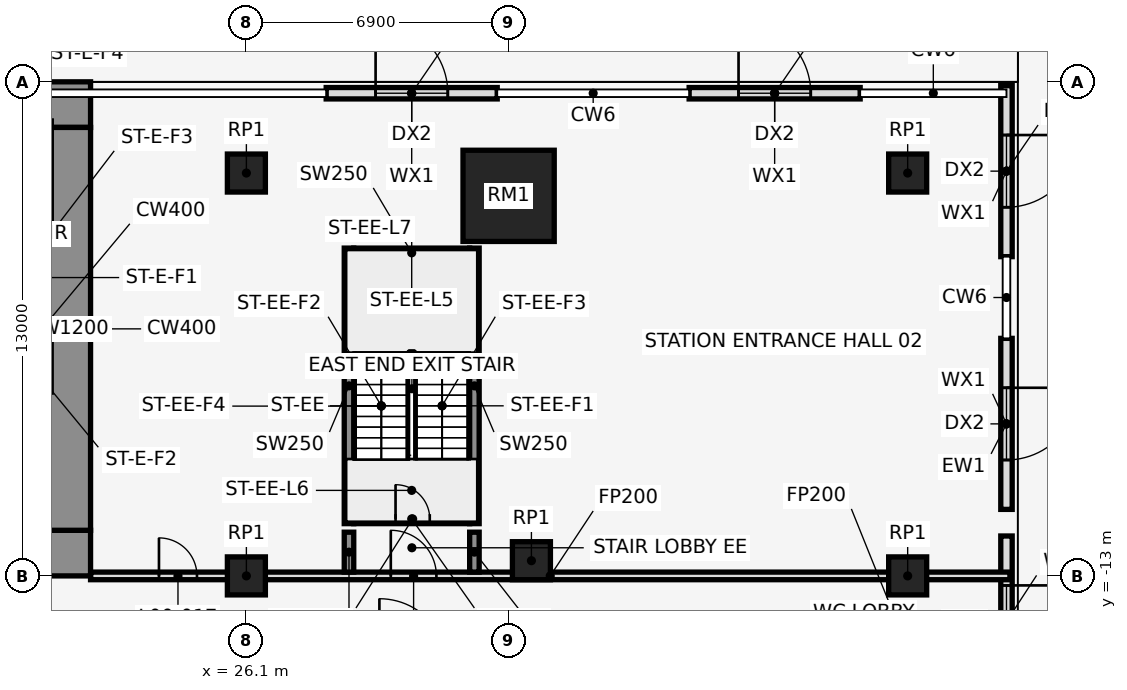
"""IFC4 building model, lengths in metres.
Left out: names, types, materials, properties, quantities, classifications, styles, units other than length and angle.
Written with IfcOpenShell. Run it as: python <this file> out.ifc"""

import sys

from ifc_helpers import new_model, si_unit, direction, frame, frame_2d, origin, origin_2d, place, context, subcontext, project, spatial, rectangle, extrude, element, fill, save


model = new_model("IFC4")
c1 = context("Model", 3, precision=1e-05, world=origin(), true_north=direction((0.0, 1.0)))
c2 = subcontext(c1, "Body", "Model", "MODEL_VIEW")
j1 = project(units=[si_unit("LENGTHUNIT", "METRE"), si_unit("PLANEANGLEUNIT", "RADIAN")], contexts=[c1])
p1 = place(None, origin())
s1 = spatial("IfcSite", under=j1, at=p1, CompositionType="ELEMENT")
p2 = place(p1, origin())
s2 = spatial("IfcBuilding", under=s1, at=p2, CompositionType="ELEMENT")
p3 = place(p2, origin())
s3 = spatial("IfcBuildingStorey", under=s2, at=p3, CompositionType="ELEMENT", Elevation=0.0)
p4 = place(p3, frame((26.1, -2.4, 0.0), z_axis=(0.0, 0.0, 1.0), x_axis=(1.0, 0.0, 0.0)))
e1 = element("IfcColumn", 1, at=p4, inside=s3, PredefinedType="COLUMN", context=c2, shape_type="SweptSolid", body=[
    extrude(rectangle(XDim=1.0, YDim=1.0, at=origin_2d()), origin(), (0.0, 0.0, 1.0), 8.0),
])
p5 = place(p3, frame((33.0, -3.0, 0.0), z_axis=(0.0, 0.0, 1.0), x_axis=(1.0, 0.0, 0.0)))
e2 = element("IfcColumn", 2, at=p5, inside=s3, PredefinedType="COLUMN", context=c2, shape_type="SweptSolid", body=[
    extrude(rectangle(XDim=2.4, YDim=2.4, at=origin_2d()), origin(), (0.0, 0.0, 1.0), 8.0),
])
for number, where, z_axis, x_axis in (
    (3, (33.6, -12.6, 0.0), (0.0, 0.0, 1.0), (1.0, 0.0, 0.0)),
    (4, (26.1, -13.0, 0.0), (0.0, 0.0, 1.0), (1.0, 0.0, 0.0)),
    (5, (43.5, -2.4, 0.0), (0.0, 0.0, 1.0), (1.0, 0.0, 0.0)),
    (6, (43.5, -13.0, 0.0), (0.0, 0.0, 1.0), (1.0, 0.0, 0.0)),
):
    element("IfcColumn", number, at=place(p3, frame(where, z_axis=z_axis, x_axis=x_axis)), inside=s3, PredefinedType="COLUMN", context=c2, shape_type="SweptSolid", body=[
        extrude(rectangle(XDim=1.0, YDim=1.0, at=origin_2d()), origin(), (0.0, 0.0, 1.0), 8.0),
    ])
p6 = place(p3, frame((46.1, -11.95, 0.0), z_axis=(0.0, 0.0, 1.0), x_axis=(0.0, -1.0, 0.0)))
e7 = element("IfcWall", 7, at=p6, inside=s3, PredefinedType="STANDARD", context=c2, shape_type="SweptSolid", body=[
    extrude(rectangle(XDim=4.5, YDim=0.3, at=frame_2d((2.25, 0.0))), origin(), (0.0, 0.0, 1.0), 7.7),
])
p7 = place(p6, frame((1.3, 0.0, 0.0)))
e8 = element("IfcOpeningElement", 8, at=p7, cuts=e7, PredefinedType="OPENING", context=c2, shape_type="SweptSolid", body=[
    extrude(rectangle(XDim=1.9, YDim=2.6, at=frame_2d((0.95, 1.3))), frame((0.0, 0.162, 0.0), z_axis=(0.0, -1.0, 0.0), x_axis=(1.0, 0.0, 0.0)), (0.0, 0.0, 1.0), 0.324),
])
p8 = place(p6, frame((1.3, 0.0, 3.3)))
e9 = element("IfcOpeningElement", 9, at=p8, cuts=e7, PredefinedType="OPENING", context=c2, shape_type="SweptSolid", body=[
    extrude(rectangle(XDim=1.9, YDim=3.0, at=frame_2d((0.95, 1.5))), frame((0.0, 0.162, 0.0), z_axis=(0.0, -1.0, 0.0), x_axis=(1.0, 0.0, 0.0)), (0.0, 0.0, 1.0), 0.324),
])
p9 = place(p3, frame((46.1, -6.75, 0.0), z_axis=(0.0, 0.0, 1.0), x_axis=(0.0, -1.0, 0.0)))
e10 = element("IfcWall", 10, at=p9, inside=s3, PredefinedType="STANDARD", context=c2, shape_type="SweptSolid", body=[
    extrude(rectangle(XDim=4.5, YDim=0.3, at=frame_2d((2.25, 0.0))), origin(), (0.0, 0.0, 1.0), 7.7),
])
p10 = place(p9, frame((1.3, 0.0, 0.0)))
e11 = element("IfcOpeningElement", 11, at=p10, cuts=e10, PredefinedType="OPENING", context=c2, shape_type="SweptSolid", body=[
    extrude(rectangle(XDim=1.9, YDim=2.6, at=frame_2d((0.95, 1.3))), frame((0.0, 0.162, 0.0), z_axis=(0.0, -1.0, 0.0), x_axis=(1.0, 0.0, 0.0)), (0.0, 0.0, 1.0), 0.324),
])
p11 = place(p9, frame((1.3, 0.0, 3.3)))
e12 = element("IfcOpeningElement", 12, at=p11, cuts=e10, PredefinedType="OPENING", context=c2, shape_type="SweptSolid", body=[
    extrude(rectangle(XDim=1.9, YDim=3.0, at=frame_2d((0.95, 1.5))), frame((0.0, 0.162, 0.0), z_axis=(0.0, -1.0, 0.0), x_axis=(1.0, 0.0, 0.0)), (0.0, 0.0, 1.0), 0.324),
])
p12 = place(p3, frame((46.1, -0.1, 0.0), z_axis=(0.0, 0.0, 1.0), x_axis=(0.0, -1.0, 0.0)))
e13 = element("IfcWall", 13, at=p12, inside=s3, PredefinedType="STANDARD", context=c2, shape_type="SweptSolid", body=[
    extrude(rectangle(XDim=4.5, YDim=0.3, at=frame_2d((2.25, 0.0))), origin(), (0.0, 0.0, 1.0), 7.7),
])
p13 = place(p12, frame((1.3, 0.0, 0.0)))
e14 = element("IfcOpeningElement", 14, at=p13, cuts=e13, PredefinedType="OPENING", context=c2, shape_type="SweptSolid", body=[
    extrude(rectangle(XDim=1.9, YDim=2.6, at=frame_2d((0.95, 1.3))), frame((0.0, 0.162, 0.0), z_axis=(0.0, -1.0, 0.0), x_axis=(1.0, 0.0, 0.0)), (0.0, 0.0, 1.0), 0.324),
])
p14 = place(p12, frame((1.3, 0.0, 3.3)))
e15 = element("IfcOpeningElement", 15, at=p14, cuts=e13, PredefinedType="OPENING", context=c2, shape_type="SweptSolid", body=[
    extrude(rectangle(XDim=1.9, YDim=3.0, at=frame_2d((0.95, 1.5))), frame((0.0, 0.162, 0.0), z_axis=(0.0, -1.0, 0.0), x_axis=(1.0, 0.0, 0.0)), (0.0, 0.0, 1.0), 0.324),
])
p15 = place(p3, frame((37.75, -0.3, 0.0), z_axis=(0.0, 0.0, 1.0), x_axis=(1.0, 0.0, 0.0)))
e16 = element("IfcWall", 16, at=p15, inside=s3, PredefinedType="STANDARD", context=c2, shape_type="SweptSolid", body=[
    extrude(rectangle(XDim=4.5, YDim=0.3, at=frame_2d((2.25, 0.0))), origin(), (0.0, 0.0, 1.0), 7.7),
])
p16 = place(p15, frame((1.3, 0.0, 0.0)))
e17 = element("IfcOpeningElement", 17, at=p16, cuts=e16, PredefinedType="OPENING", context=c2, shape_type="SweptSolid", body=[
    extrude(rectangle(XDim=1.9, YDim=2.6, at=frame_2d((0.95, 1.3))), frame((0.0, 0.162, 0.0), z_axis=(0.0, -1.0, 0.0), x_axis=(1.0, 0.0, 0.0)), (0.0, 0.0, 1.0), 0.324),
])
p17 = place(p15, frame((1.3, 0.0, 3.3)))
e18 = element("IfcOpeningElement", 18, at=p17, cuts=e16, PredefinedType="OPENING", context=c2, shape_type="SweptSolid", body=[
    extrude(rectangle(XDim=1.9, YDim=3.0, at=frame_2d((0.95, 1.5))), frame((0.0, 0.162, 0.0), z_axis=(0.0, -1.0, 0.0), x_axis=(1.0, 0.0, 0.0)), (0.0, 0.0, 1.0), 0.324),
])
p18 = place(p3, frame((28.2, -0.3, 0.0), z_axis=(0.0, 0.0, 1.0), x_axis=(1.0, 0.0, 0.0)))
e19 = element("IfcWall", 19, at=p18, inside=s3, PredefinedType="STANDARD", context=c2, shape_type="SweptSolid", body=[
    extrude(rectangle(XDim=4.5, YDim=0.3, at=frame_2d((2.25, 0.0))), origin(), (0.0, 0.0, 1.0), 7.7),
])
p19 = place(p18, frame((1.3, 0.0, 0.0)))
e20 = element("IfcOpeningElement", 20, at=p19, cuts=e19, PredefinedType="OPENING", context=c2, shape_type="SweptSolid", body=[
    extrude(rectangle(XDim=1.9, YDim=2.6, at=frame_2d((0.95, 1.3))), frame((0.0, 0.162, 0.0), z_axis=(0.0, -1.0, 0.0), x_axis=(1.0, 0.0, 0.0)), (0.0, 0.0, 1.0), 0.324),
])
p20 = place(p18, frame((1.3, 0.0, 3.3)))
e21 = element("IfcOpeningElement", 21, at=p20, cuts=e19, PredefinedType="OPENING", context=c2, shape_type="SweptSolid", body=[
    extrude(rectangle(XDim=1.9, YDim=3.0, at=frame_2d((0.95, 1.5))), frame((0.0, 0.162, 0.0), z_axis=(0.0, -1.0, 0.0), x_axis=(1.0, 0.0, 0.0)), (0.0, 0.0, 1.0), 0.324),
])
for number, where, z_axis, x_axis in (
    (22, (28.8, -11.625, 0.0), (0.0, 0.0, 1.0), (0.0, 1.0, 0.0)),
    (23, (32.1, -11.625, 0.0), (0.0, 0.0, 1.0), (0.0, 1.0, 0.0)),
):
    element("IfcWall", number, at=place(p3, frame(where, z_axis=z_axis, x_axis=x_axis)), inside=s3, PredefinedType="SHEAR", context=c2, shape_type="SweptSolid", body=[
        extrude(rectangle(XDim=7.25, YDim=0.25, at=frame_2d((3.625, 0.0))), origin(), (0.0, 0.0, 1.0), 8.0),
    ])
p21 = place(p3, frame((28.925, -11.5, 0.0), z_axis=(0.0, 0.0, 1.0), x_axis=(1.0, 0.0, 0.0)))
e24 = element("IfcWall", 24, at=p21, inside=s3, PredefinedType="SHEAR", context=c2, shape_type="SweptSolid", body=[
    extrude(rectangle(XDim=3.05, YDim=0.25, at=frame_2d((1.525, 0.0))), origin(), (0.0, 0.0, 1.0), 8.0),
])
p22 = place(p21, frame((1.1, 0.0, 0.0)))
e25 = element("IfcOpeningElement", 25, at=p22, cuts=e24, PredefinedType="OPENING", context=c2, shape_type="SweptSolid", body=[
    extrude(rectangle(XDim=0.9, YDim=2.1, at=frame_2d((0.45, 1.05))), frame((0.0, 0.137, 0.0), z_axis=(0.0, -1.0, 0.0), x_axis=(1.0, 0.0, 0.0)), (0.0, 0.0, 1.0), 0.274),
])
p23 = place(p3, frame((28.925, -4.5, 0.0), z_axis=(0.0, 0.0, 1.0), x_axis=(1.0, 0.0, 0.0)))
e26 = element("IfcWall", 26, at=p23, inside=s3, PredefinedType="SHEAR", context=c2, shape_type="SweptSolid", body=[
    extrude(rectangle(XDim=3.05, YDim=0.25, at=frame_2d((1.525, 0.0))), origin(), (0.0, 0.0, 1.0), 8.0),
])
p24 = place(p3, frame((22.0, -13.0, 0.0), z_axis=(0.0, 0.0, 1.0), x_axis=(1.0, 0.0, 0.0)))
e27 = element("IfcWall", 27, at=p24, inside=s3, PredefinedType="PARTITIONING", context=c2, shape_type="SweptSolid", body=[
    extrude(rectangle(XDim=24.19, YDim=0.2, at=frame_2d((12.095, 0.0))), origin(), (0.0, 0.0, 1.0), 7.7),
])
p25 = place(p24, frame((7.9, 0.0, 0.0)))
e28 = element("IfcOpeningElement", 28, at=p25, cuts=e27, PredefinedType="OPENING", context=c2, shape_type="SweptSolid", body=[
    extrude(rectangle(XDim=1.2, YDim=2.1, at=frame_2d((0.6, 1.05))), frame((0.0, 0.112, 0.0), z_axis=(0.0, -1.0, 0.0), x_axis=(1.0, 0.0, 0.0)), (0.0, 0.0, 1.0), 0.224),
])
p26 = place(p24, frame((1.8, 0.0, 0.0)))
e29 = element("IfcOpeningElement", 29, at=p26, cuts=e27, PredefinedType="OPENING", context=c2, shape_type="SweptSolid", body=[
    extrude(rectangle(XDim=1.0, YDim=2.1, at=frame_2d((0.5, 1.05))), frame((0.0, 0.112, 0.0), z_axis=(0.0, -1.0, 0.0), x_axis=(1.0, 0.0, 0.0)), (0.0, 0.0, 1.0), 0.224),
])
for number, where, z_axis, x_axis in (
    (30, (28.8, -12.9, 0.0), (0.0, 0.0, 1.0), (0.0, 1.0, 0.0)),
    (31, (32.1, -12.9, 0.0), (0.0, 0.0, 1.0), (0.0, 1.0, 0.0)),
):
    element("IfcWall", number, at=place(p3, frame(where, z_axis=z_axis, x_axis=x_axis)), inside=s3, PredefinedType="SHEAR", context=c2, shape_type="SweptSolid", body=[
        extrude(rectangle(XDim=1.05, YDim=0.25, at=frame_2d((0.525, 0.0))), origin(), (0.0, 0.0, 1.0), 8.0),
    ])
p27 = place(p3, frame((-22.0, -0.6, 0.0), z_axis=(0.0, 0.0, 1.0), x_axis=(1.0, 0.0, 0.0)))
e32 = element("IfcWall", 32, at=p27, inside=s3, PredefinedType="SHEAR", context=c2, shape_type="SweptSolid", body=[
    extrude(rectangle(XDim=44.0, YDim=1.2, at=frame_2d((22.0, 0.0))), origin(), (0.0, 0.0, 1.0), 8.0),
])
p28 = place(p3, frame((-22.0, -12.4, 0.0), z_axis=(0.0, 0.0, 1.0), x_axis=(1.0, 0.0, 0.0)))
e33 = element("IfcWall", 33, at=p28, inside=s3, PredefinedType="SHEAR", context=c2, shape_type="SweptSolid", body=[
    extrude(rectangle(XDim=44.0, YDim=1.2, at=frame_2d((22.0, 0.0))), origin(), (0.0, 0.0, 1.0), 8.0),
])
p29 = place(p28, frame((2.2, 0.0, 0.0)))
e34 = element("IfcOpeningElement", 34, at=p29, cuts=e33, PredefinedType="OPENING", context=c2, shape_type="SweptSolid", body=[
    extrude(rectangle(XDim=1.2, YDim=2.1, at=frame_2d((0.6, 1.05))), frame((0.0, 0.612, 0.0), z_axis=(0.0, -1.0, 0.0), x_axis=(1.0, 0.0, 0.0)), (0.0, 0.0, 1.0), 1.224),
])
p30 = place(p28, frame((21.4, 0.0, 0.0)))
e35 = element("IfcOpeningElement", 35, at=p30, cuts=e33, PredefinedType="OPENING", context=c2, shape_type="SweptSolid", body=[
    extrude(rectangle(XDim=1.2, YDim=2.1, at=frame_2d((0.6, 1.05))), frame((0.0, 0.612, 0.0), z_axis=(0.0, -1.0, 0.0), x_axis=(1.0, 0.0, 0.0)), (0.0, 0.0, 1.0), 1.224),
])
p31 = place(p28, frame((40.6, 0.0, 0.0)))
e36 = element("IfcOpeningElement", 36, at=p31, cuts=e33, PredefinedType="OPENING", context=c2, shape_type="SweptSolid", body=[
    extrude(rectangle(XDim=1.2, YDim=2.1, at=frame_2d((0.6, 1.05))), frame((0.0, 0.612, 0.0), z_axis=(0.0, -1.0, 0.0), x_axis=(1.0, 0.0, 0.0)), (0.0, 0.0, 1.0), 1.224),
])
p32 = place(p28, frame((16.0, 0.0, 0.0)))
e37 = element("IfcOpeningElement", 37, at=p32, cuts=e33, PredefinedType="OPENING", context=c2, shape_type="SweptSolid", body=[
    extrude(rectangle(XDim=1.8, YDim=2.1, at=frame_2d((0.9, 1.05))), frame((0.0, 0.612, 0.0), z_axis=(0.0, -1.0, 0.0), x_axis=(1.0, 0.0, 0.0)), (0.0, 0.0, 1.0), 1.224),
])
p33 = place(p28, frame((6.3, 0.0, 0.0)))
e38 = element("IfcOpeningElement", 38, at=p33, cuts=e33, PredefinedType="OPENING", context=c2, shape_type="SweptSolid", body=[
    extrude(rectangle(XDim=1.2, YDim=2.1, at=frame_2d((0.6, 1.05))), frame((0.0, 0.612, 0.0), z_axis=(0.0, -1.0, 0.0), x_axis=(1.0, 0.0, 0.0)), (0.0, 0.0, 1.0), 1.224),
])
p34 = place(p28, frame((26.2, 0.0, 0.0)))
e39 = element("IfcOpeningElement", 39, at=p34, cuts=e33, PredefinedType="OPENING", context=c2, shape_type="SweptSolid", body=[
    extrude(rectangle(XDim=1.8, YDim=2.1, at=frame_2d((0.9, 1.05))), frame((0.0, 0.612, 0.0), z_axis=(0.0, -1.0, 0.0), x_axis=(1.0, 0.0, 0.0)), (0.0, 0.0, 1.0), 1.224),
])
p35 = place(p28, frame((36.5, 0.0, 0.0)))
e40 = element("IfcOpeningElement", 40, at=p35, cuts=e33, PredefinedType="OPENING", context=c2, shape_type="SweptSolid", body=[
    extrude(rectangle(XDim=1.2, YDim=2.1, at=frame_2d((0.6, 1.05))), frame((0.0, 0.612, 0.0), z_axis=(0.0, -1.0, 0.0), x_axis=(1.0, 0.0, 0.0)), (0.0, 0.0, 1.0), 1.224),
])
p36 = place(p3, frame((21.4, -11.8, 0.0), z_axis=(0.0, 0.0, 1.0), x_axis=(0.0, 1.0, 0.0)))
e41 = element("IfcWall", 41, at=p36, inside=s3, PredefinedType="SHEAR", context=c2, shape_type="SweptSolid", body=[
    extrude(rectangle(XDim=10.6, YDim=1.2, at=frame_2d((5.3, 0.0))), origin(), (0.0, 0.0, 1.0), 8.0),
])
p37 = place(p7, origin())
e42 = element("IfcDoor", 42, at=p37, inside=s3, OperationType="SINGLE_SWING_LEFT", PredefinedType="DOOR", context=c2, shape_type="SweptSolid", body=[
    extrude(rectangle(XDim=1.9, YDim=2.6, at=frame_2d((0.95, 1.3))), frame((0.0, 0.025, 0.0), z_axis=(0.0, -1.0, 0.0), x_axis=(1.0, 0.0, 0.0)), (0.0, 0.0, 1.0), 0.05),
])
fill(e8, e42)
p38 = place(p8, origin())
e43 = element("IfcWindow", 43, at=p38, inside=s3, PartitioningType="SINGLE_PANEL", PredefinedType="WINDOW", context=c2, shape_type="SweptSolid", body=[
    extrude(rectangle(XDim=1.9, YDim=3.0, at=frame_2d((0.95, 1.5))), frame((0.0, 0.03, 0.0), z_axis=(0.0, -1.0, 0.0), x_axis=(1.0, 0.0, 0.0)), (0.0, 0.0, 1.0), 0.06),
])
fill(e9, e43)
p39 = place(p10, origin())
e44 = element("IfcDoor", 44, at=p39, inside=s3, OperationType="SINGLE_SWING_LEFT", PredefinedType="DOOR", context=c2, shape_type="SweptSolid", body=[
    extrude(rectangle(XDim=1.9, YDim=2.6, at=frame_2d((0.95, 1.3))), frame((0.0, 0.025, 0.0), z_axis=(0.0, -1.0, 0.0), x_axis=(1.0, 0.0, 0.0)), (0.0, 0.0, 1.0), 0.05),
])
fill(e11, e44)
p40 = place(p11, origin())
e45 = element("IfcWindow", 45, at=p40, inside=s3, PartitioningType="SINGLE_PANEL", PredefinedType="WINDOW", context=c2, shape_type="SweptSolid", body=[
    extrude(rectangle(XDim=1.9, YDim=3.0, at=frame_2d((0.95, 1.5))), frame((0.0, 0.03, 0.0), z_axis=(0.0, -1.0, 0.0), x_axis=(1.0, 0.0, 0.0)), (0.0, 0.0, 1.0), 0.06),
])
fill(e12, e45)
p41 = place(p13, origin())
e46 = element("IfcDoor", 46, at=p41, inside=s3, OperationType="SINGLE_SWING_LEFT", PredefinedType="DOOR", context=c2, shape_type="SweptSolid", body=[
    extrude(rectangle(XDim=1.9, YDim=2.6, at=frame_2d((0.95, 1.3))), frame((0.0, 0.025, 0.0), z_axis=(0.0, -1.0, 0.0), x_axis=(1.0, 0.0, 0.0)), (0.0, 0.0, 1.0), 0.05),
])
fill(e14, e46)
p42 = place(p14, origin())
e47 = element("IfcWindow", 47, at=p42, inside=s3, PartitioningType="SINGLE_PANEL", PredefinedType="WINDOW", context=c2, shape_type="SweptSolid", body=[
    extrude(rectangle(XDim=1.9, YDim=3.0, at=frame_2d((0.95, 1.5))), frame((0.0, 0.03, 0.0), z_axis=(0.0, -1.0, 0.0), x_axis=(1.0, 0.0, 0.0)), (0.0, 0.0, 1.0), 0.06),
])
fill(e15, e47)
p43 = place(p16, origin())
e48 = element("IfcDoor", 48, at=p43, inside=s3, OperationType="SINGLE_SWING_LEFT", PredefinedType="DOOR", context=c2, shape_type="SweptSolid", body=[
    extrude(rectangle(XDim=1.9, YDim=2.6, at=frame_2d((0.95, 1.3))), frame((0.0, 0.025, 0.0), z_axis=(0.0, -1.0, 0.0), x_axis=(1.0, 0.0, 0.0)), (0.0, 0.0, 1.0), 0.05),
])
fill(e17, e48)
p44 = place(p17, origin())
e49 = element("IfcWindow", 49, at=p44, inside=s3, PartitioningType="SINGLE_PANEL", PredefinedType="WINDOW", context=c2, shape_type="SweptSolid", body=[
    extrude(rectangle(XDim=1.9, YDim=3.0, at=frame_2d((0.95, 1.5))), frame((0.0, 0.03, 0.0), z_axis=(0.0, -1.0, 0.0), x_axis=(1.0, 0.0, 0.0)), (0.0, 0.0, 1.0), 0.06),
])
fill(e18, e49)
p45 = place(p19, origin())
e50 = element("IfcDoor", 50, at=p45, inside=s3, OperationType="SINGLE_SWING_LEFT", PredefinedType="DOOR", context=c2, shape_type="SweptSolid", body=[
    extrude(rectangle(XDim=1.9, YDim=2.6, at=frame_2d((0.95, 1.3))), frame((0.0, 0.025, 0.0), z_axis=(0.0, -1.0, 0.0), x_axis=(1.0, 0.0, 0.0)), (0.0, 0.0, 1.0), 0.05),
])
fill(e20, e50)
p46 = place(p20, origin())
e51 = element("IfcWindow", 51, at=p46, inside=s3, PartitioningType="SINGLE_PANEL", PredefinedType="WINDOW", context=c2, shape_type="SweptSolid", body=[
    extrude(rectangle(XDim=1.9, YDim=3.0, at=frame_2d((0.95, 1.5))), frame((0.0, 0.03, 0.0), z_axis=(0.0, -1.0, 0.0), x_axis=(1.0, 0.0, 0.0)), (0.0, 0.0, 1.0), 0.06),
])
fill(e21, e51)
p47 = place(p25, origin())
e52 = element("IfcDoor", 52, at=p47, inside=s3, OperationType="SINGLE_SWING_LEFT", PredefinedType="DOOR", context=c2, shape_type="SweptSolid", body=[
    extrude(rectangle(XDim=1.2, YDim=2.1, at=frame_2d((0.6, 1.05))), frame((0.0, 0.025, 0.0), z_axis=(0.0, -1.0, 0.0), x_axis=(1.0, 0.0, 0.0)), (0.0, 0.0, 1.0), 0.05),
])
fill(e28, e52)
p48 = place(p22, origin())
e53 = element("IfcDoor", 53, at=p48, inside=s3, OperationType="SINGLE_SWING_RIGHT", PredefinedType="DOOR", context=c2, shape_type="SweptSolid", body=[
    extrude(rectangle(XDim=0.9, YDim=2.1, at=frame_2d((0.45, 1.05))), frame((0.0, 0.025, 0.0), z_axis=(0.0, -1.0, 0.0), x_axis=(1.0, 0.0, 0.0)), (0.0, 0.0, 1.0), 0.05),
])
fill(e25, e53)
p49 = place(p26, origin())
e54 = element("IfcDoor", 54, at=p49, inside=s3, OperationType="SINGLE_SWING_LEFT", PredefinedType="DOOR", context=c2, shape_type="SweptSolid", body=[
    extrude(rectangle(XDim=1.0, YDim=2.1, at=frame_2d((0.5, 1.05))), frame((0.0, 0.025, 0.0), z_axis=(0.0, -1.0, 0.0), x_axis=(1.0, 0.0, 0.0)), (0.0, 0.0, 1.0), 0.05),
])
fill(e29, e54)
save(model, sys.argv[1])
